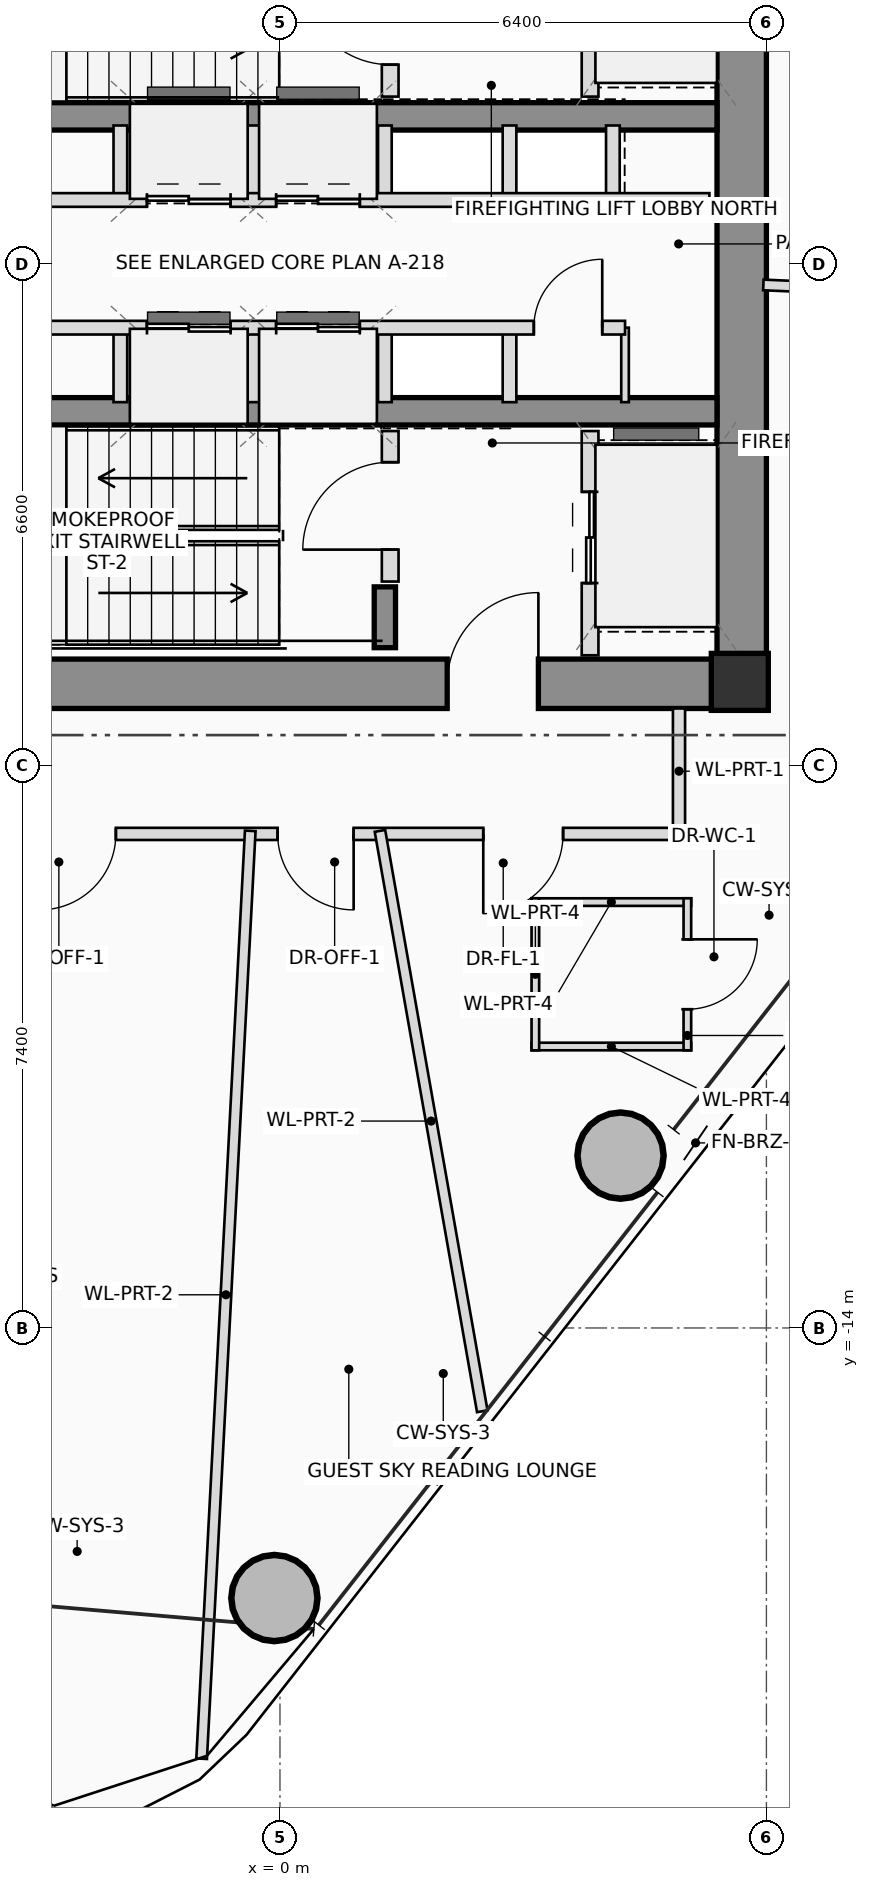
"""IFC4 building model, lengths in metres.
Left out: names, types, materials, properties, quantities, classifications, styles, units other than length and angle.
Written with IfcOpenShell. Run it as: python <this file> out.ifc"""

import sys

from ifc_helpers import new_model, si_unit, direction, frame, frame_2d, origin, origin_2d, place, context, subcontext, project, spatial, rectangle, hollow_circle, extrude, source, transform, mapped, element, fill, save


model = new_model("IFC4")
c1 = context("Model", 3, precision=1e-05, world=origin(), true_north=direction((0.0, 1.0)))
c2 = subcontext(c1, "Body", "Model", "MODEL_VIEW")
j1 = project(units=[si_unit("LENGTHUNIT", "METRE"), si_unit("PLANEANGLEUNIT", "RADIAN")], contexts=[c1])
p1 = place(None, origin())
s1 = spatial("IfcSite", under=j1, at=p1, CompositionType="ELEMENT")
p2 = place(p1, origin())
s2 = spatial("IfcBuilding", under=s1, at=p2, CompositionType="ELEMENT")
p3 = place(p2, frame((0.0, 0.0, 191.45)))
s3 = spatial("IfcBuildingStorey", under=s2, at=p3, CompositionType="ELEMENT", Elevation=191.45)
m1 = source(origin(), c2, "Body", "SweptSolid", [
    extrude(rectangle(XDim=0.75, YDim=0.75, at=origin_2d()), origin(), (0.0, 0.0, 1.0), 3.45),
])
p4 = place(p3, frame((6.05, -5.5, 0.0), z_axis=(0.0, 0.0, 1.0), x_axis=(1.0, 0.0, 0.0)))
e1 = element("IfcColumn", 1, at=p4, inside=s3, PredefinedType="COLUMN", context=c2, shape_type="MappedRepresentation", body=[
    mapped(m1, transform((0.0, 0.0, 0.0), scale=1.0)),
])
p5 = place(p3, frame((-6.4, -5.525, 0.0), z_axis=(0.0, 0.0, 1.0), x_axis=(1.0, 0.0, 0.0)))
e2 = element("IfcWall", 2, at=p5, inside=s3, PredefinedType="SHEAR", context=c2, shape_type="SweptSolid", body=[
    extrude(rectangle(XDim=12.8, YDim=0.65, at=frame_2d((6.4, 0.0))), origin(), (0.0, 0.0, 1.0), 3.45),
])
p6 = place(p5, frame((8.6, 0.0, 0.0)))
e3 = element("IfcOpeningElement", 3, at=p6, cuts=e2, PredefinedType="OPENING", context=c2, shape_type="SweptSolid", body=[
    extrude(rectangle(XDim=1.2, YDim=2.2, at=frame_2d((0.6, 1.1))), frame((0.0, 0.335, 0.0), z_axis=(0.0, -1.0, 0.0), x_axis=(1.0, 0.0, 0.0)), (0.0, 0.0, 1.0), 0.67),
])
p7 = place(p3, frame((6.075, -5.2, 0.0), z_axis=(0.0, 0.0, 1.0), x_axis=(0.0, 1.0, 0.0)))
e4 = element("IfcWall", 4, at=p7, inside=s3, PredefinedType="SHEAR", context=c2, shape_type="SweptSolid", body=[
    extrude(rectangle(XDim=10.4, YDim=0.65, at=frame_2d((5.2, 0.0))), origin(), (0.0, 0.0, 1.0), 3.45),
])
for number, where, z_axis, x_axis in (
    (5, (-5.75, 1.94, 0.0), (0.0, 0.0, 1.0), (1.0, 0.0, 0.0)),
    (6, (-5.75, -1.94, 0.0), (0.0, 0.0, 1.0), (1.0, 0.0, 0.0)),
):
    element("IfcWall", number, at=place(p3, frame(where, z_axis=z_axis, x_axis=x_axis)), inside=s3, PredefinedType="SHEAR", context=c2, shape_type="SweptSolid", body=[
        extrude(rectangle(XDim=11.5, YDim=0.36, at=frame_2d((5.75, 0.0))), origin(), (0.0, 0.0, 1.0), 3.45),
    ])
p8 = place(p3, frame((1.38, -5.05, 0.0), z_axis=(0.0, 0.0, 1.0), x_axis=(0.0, 1.0, 0.0)))
e7 = element("IfcWall", 7, at=p8, inside=s3, PredefinedType="SHEAR", context=c2, shape_type="SweptSolid", body=[
    extrude(rectangle(XDim=0.8, YDim=0.28, at=frame_2d((0.4, 0.0))), origin(), (0.0, 0.0, 1.0), 3.45),
])
m2 = source(origin(), c2, "Body", "SweptSolid", [
    extrude(hollow_circle(Radius=0.575, WallThickness=0.042, at=origin_2d()), origin(), (0.0, 0.0, 1.0), 3.45),
])
for number, where, z_axis, x_axis in (
    (8, (-0.073, -17.553, 0.0), (0.0, 0.0, 1.0), (1.0, 0.0, 0.0)),
    (9, (4.481, -11.732, 0.0), (0.0, 0.0, 1.0), (1.0, 0.0, 0.0)),
):
    element("IfcColumn", number, at=place(p3, frame(where, z_axis=z_axis, x_axis=x_axis)), inside=s3, PredefinedType="COLUMN", context=c2, shape_type="MappedRepresentation", body=[
        mapped(m2, transform((0.0, 0.0, 0.0), scale=1.0)),
    ])
p9 = place(p3, frame((1.45, 2.2, 0.0), z_axis=(0.0, 0.0, 1.0), x_axis=(0.0, 1.0, 0.0)))
e10 = element("IfcWall", 10, at=p9, inside=s3, PredefinedType="PLUMBINGWALL", context=c2, shape_type="SweptSolid", body=[
    extrude(rectangle(XDim=1.98, YDim=0.22, at=frame_2d((0.99, 0.0))), origin(), (0.0, 0.0, 1.0), 3.25),
])
p10 = place(p9, frame((0.42, 0.0, 0.0)))
e11 = element("IfcOpeningElement", 11, at=p10, cuts=e10, PredefinedType="OPENING", context=c2, shape_type="SweptSolid", body=[
    extrude(rectangle(XDim=1.15, YDim=2.15, at=frame_2d((0.575, 1.075))), frame((0.0, 0.12, 0.0), z_axis=(0.0, -1.0, 0.0), x_axis=(1.0, 0.0, 0.0)), (0.0, 0.0, 1.0), 0.24),
])
p11 = place(p3, frame((4.08, 2.2, 0.0), z_axis=(0.0, 0.0, 1.0), x_axis=(0.0, 1.0, 0.0)))
e12 = element("IfcWall", 12, at=p11, inside=s3, PredefinedType="PLUMBINGWALL", context=c2, shape_type="SweptSolid", body=[
    extrude(rectangle(XDim=2.95, YDim=0.22, at=frame_2d((1.475, 0.0))), origin(), (0.0, 0.0, 1.0), 3.25),
])
p12 = place(p11, frame((0.75, 0.0, 0.0)))
e13 = element("IfcOpeningElement", 13, at=p12, cuts=e12, PredefinedType="OPENING", context=c2, shape_type="SweptSolid", body=[
    extrude(rectangle(XDim=1.2, YDim=2.25, at=frame_2d((0.6, 1.125))), frame((0.0, 0.12, 0.0), z_axis=(0.0, -1.0, 0.0), x_axis=(1.0, 0.0, 0.0)), (0.0, 0.0, 1.0), 0.24),
])
p13 = place(p3, frame((1.45, -4.18, 0.0), z_axis=(0.0, 0.0, 1.0), x_axis=(0.0, 1.0, 0.0)))
e14 = element("IfcWall", 14, at=p13, inside=s3, PredefinedType="PLUMBINGWALL", context=c2, shape_type="SweptSolid", body=[
    extrude(rectangle(XDim=1.98, YDim=0.22, at=frame_2d((0.99, 0.0))), origin(), (0.0, 0.0, 1.0), 3.25),
])
p14 = place(p13, frame((0.42, 0.0, 0.0)))
e15 = element("IfcOpeningElement", 15, at=p14, cuts=e14, PredefinedType="OPENING", context=c2, shape_type="SweptSolid", body=[
    extrude(rectangle(XDim=1.15, YDim=2.15, at=frame_2d((0.575, 1.075))), frame((0.0, 0.12, 0.0), z_axis=(0.0, -1.0, 0.0), x_axis=(1.0, 0.0, 0.0)), (0.0, 0.0, 1.0), 0.24),
])
p15 = place(p3, frame((4.08, -5.15, 0.0), z_axis=(0.0, 0.0, 1.0), x_axis=(0.0, 1.0, 0.0)))
e16 = element("IfcWall", 16, at=p15, inside=s3, PredefinedType="PLUMBINGWALL", context=c2, shape_type="SweptSolid", body=[
    extrude(rectangle(XDim=2.95, YDim=0.22, at=frame_2d((1.475, 0.0))), origin(), (0.0, 0.0, 1.0), 3.25),
])
p16 = place(p15, frame((0.95, 0.0, 0.0)))
e17 = element("IfcOpeningElement", 17, at=p16, cuts=e16, PredefinedType="OPENING", context=c2, shape_type="SweptSolid", body=[
    extrude(rectangle(XDim=1.2, YDim=2.25, at=frame_2d((0.6, 1.125))), frame((0.0, 0.12, 0.0), z_axis=(0.0, -1.0, 0.0), x_axis=(1.0, 0.0, 0.0)), (0.0, 0.0, 1.0), 0.24),
])
for number, where, z_axis, x_axis in (
    (18, (-2.1, 0.84, 0.0), (0.0, 0.0, 1.0), (0.0, 1.0, 0.0)),
    (19, (-2.1, -1.82, 0.0), (0.0, 0.0, 1.0), (0.0, 1.0, 0.0)),
    (20, (-0.35, 0.84, 0.0), (0.0, 0.0, 1.0), (0.0, 1.0, 0.0)),
    (21, (-0.35, -1.82, 0.0), (0.0, 0.0, 1.0), (0.0, 1.0, 0.0)),
    (22, (1.38, 0.84, 0.0), (0.0, 0.0, 1.0), (0.0, 1.0, 0.0)),
    (23, (1.38, -1.82, 0.0), (0.0, 0.0, 1.0), (0.0, 1.0, 0.0)),
    (24, (3.02, 0.84, 0.0), (0.0, 0.0, 1.0), (0.0, 1.0, 0.0)),
    (25, (4.38, 0.84, 0.0), (0.0, 0.0, 1.0), (0.0, 1.0, 0.0)),
    (26, (3.02, -1.82, 0.0), (0.0, 0.0, 1.0), (0.0, 1.0, 0.0)),
):
    element("IfcWall", number, at=place(p3, frame(where, z_axis=z_axis, x_axis=x_axis)), inside=s3, PredefinedType="PLUMBINGWALL", context=c2, shape_type="SweptSolid", body=[
        extrude(rectangle(XDim=0.98, YDim=0.18, at=frame_2d((0.49, 0.0))), origin(), (0.0, 0.0, 1.0), 3.25),
    ])
p17 = place(p3, frame((4.54, -1.82, 0.0), z_axis=(0.0, 0.0, 1.0), x_axis=(0.0, 1.0, 0.0)))
e27 = element("IfcWall", 27, at=p17, inside=s3, PredefinedType="PARTITIONING", context=c2, shape_type="SweptSolid", body=[
    extrude(rectangle(XDim=0.98, YDim=0.1, at=frame_2d((0.49, 0.0))), origin(), (0.0, 0.0, 1.0), 3.25),
])
p18 = place(p3, frame((-5.68, 0.84, 0.0), z_axis=(0.0, 0.0, 1.0), x_axis=(1.0, 0.0, 0.0)))
e28 = element("IfcWall", 28, at=p18, inside=s3, PredefinedType="PLUMBINGWALL", context=c2, shape_type="SweptSolid", body=[
    extrude(rectangle(XDim=11.33, YDim=0.18, at=frame_2d((5.665, 0.0))), origin(), (0.0, 0.0, 1.0), 3.25),
])
p19 = place(p18, frame((1.38, 0.0, 0.0)))
e29 = element("IfcOpeningElement", 29, at=p19, cuts=e28, PredefinedType="OPENING", context=c2, shape_type="SweptSolid", body=[
    extrude(rectangle(XDim=0.9, YDim=2.05, at=frame_2d((0.45, 1.025))), frame((0.0, 0.1, 0.0), z_axis=(0.0, -1.0, 0.0), x_axis=(1.0, 0.0, 0.0)), (0.0, 0.0, 1.0), 0.2),
])
p20 = place(p18, frame((3.93, 0.0, 0.0)))
e30 = element("IfcOpeningElement", 30, at=p20, cuts=e28, PredefinedType="OPENING", context=c2, shape_type="SweptSolid", body=[
    extrude(rectangle(XDim=1.1, YDim=2.2, at=frame_2d((0.55, 1.1))), frame((0.0, 0.1, 0.0), z_axis=(0.0, -1.0, 0.0), x_axis=(1.0, 0.0, 0.0)), (0.0, 0.0, 1.0), 0.2),
])
p21 = place(p18, frame((5.63, 0.0, 0.0)))
e31 = element("IfcOpeningElement", 31, at=p21, cuts=e28, PredefinedType="OPENING", context=c2, shape_type="SweptSolid", body=[
    extrude(rectangle(XDim=1.1, YDim=2.2, at=frame_2d((0.55, 1.1))), frame((0.0, 0.1, 0.0), z_axis=(0.0, -1.0, 0.0), x_axis=(1.0, 0.0, 0.0)), (0.0, 0.0, 1.0), 0.2),
])
p22 = place(p3, frame((-5.68, -0.84, 0.0), z_axis=(0.0, 0.0, 1.0), x_axis=(1.0, 0.0, 0.0)))
e32 = element("IfcWall", 32, at=p22, inside=s3, PredefinedType="PLUMBINGWALL", context=c2, shape_type="SweptSolid", body=[
    extrude(rectangle(XDim=10.22, YDim=0.18, at=frame_2d((5.11, 0.0))), origin(), (0.0, 0.0, 1.0), 3.25),
])
p23 = place(p22, frame((1.38, 0.0, 0.0)))
e33 = element("IfcOpeningElement", 33, at=p23, cuts=e32, PredefinedType="OPENING", context=c2, shape_type="SweptSolid", body=[
    extrude(rectangle(XDim=0.9, YDim=2.05, at=frame_2d((0.45, 1.025))), frame((0.0, 0.1, 0.0), z_axis=(0.0, -1.0, 0.0), x_axis=(1.0, 0.0, 0.0)), (0.0, 0.0, 1.0), 0.2),
])
p24 = place(p22, frame((3.93, 0.0, 0.0)))
e34 = element("IfcOpeningElement", 34, at=p24, cuts=e32, PredefinedType="OPENING", context=c2, shape_type="SweptSolid", body=[
    extrude(rectangle(XDim=1.1, YDim=2.2, at=frame_2d((0.55, 1.1))), frame((0.0, 0.1, 0.0), z_axis=(0.0, -1.0, 0.0), x_axis=(1.0, 0.0, 0.0)), (0.0, 0.0, 1.0), 0.2),
])
p25 = place(p22, frame((5.63, 0.0, 0.0)))
e35 = element("IfcOpeningElement", 35, at=p25, cuts=e32, PredefinedType="OPENING", context=c2, shape_type="SweptSolid", body=[
    extrude(rectangle(XDim=1.1, YDim=2.2, at=frame_2d((0.55, 1.1))), frame((0.0, 0.1, 0.0), z_axis=(0.0, -1.0, 0.0), x_axis=(1.0, 0.0, 0.0)), (0.0, 0.0, 1.0), 0.2),
])
p26 = place(p22, frame((9.02, 0.0, 0.0)))
e36 = element("IfcOpeningElement", 36, at=p26, cuts=e32, PredefinedType="OPENING", context=c2, shape_type="SweptSolid", body=[
    extrude(rectangle(XDim=0.9, YDim=2.05, at=frame_2d((0.45, 1.025))), frame((0.0, 0.1, 0.0), z_axis=(0.0, -1.0, 0.0), x_axis=(1.0, 0.0, 0.0)), (0.0, 0.0, 1.0), 0.2),
])
for number, where, z_axis, x_axis in (
    (37, (3.31, -8.397, 0.0), (0.0, 0.0, 1.0), (1.0, 0.0, 0.0)),
    (38, (5.41, -10.297, 0.0), (0.0, 0.0, 1.0), (-1.0, 0.0, 0.0)),
):
    element("IfcWall", number, at=place(p3, frame(where, z_axis=z_axis, x_axis=x_axis)), inside=s3, PredefinedType="PARTITIONING", context=c2, shape_type="SweptSolid", body=[
        extrude(rectangle(XDim=2.1, YDim=0.1, at=frame_2d((1.05, 0.0))), origin(), (0.0, 0.0, 1.0), 2.605),
    ])
p27 = place(p3, frame((5.36, -8.347, 0.0), z_axis=(0.0, 0.0, 1.0), x_axis=(0.0, -1.0, 0.0)))
e39 = element("IfcWall", 39, at=p27, inside=s3, PredefinedType="PARTITIONING", context=c2, shape_type="SweptSolid", body=[
    extrude(rectangle(XDim=2.0, YDim=0.1, at=frame_2d((1.0, 0.0))), origin(), (0.0, 0.0, 1.0), 2.605),
])
p28 = place(p27, frame((0.54, 0.0, 0.0)))
e40 = element("IfcOpeningElement", 40, at=p28, cuts=e39, PredefinedType="OPENING", context=c2, shape_type="SweptSolid", body=[
    extrude(rectangle(XDim=0.92, YDim=2.1, at=frame_2d((0.46, 1.05))), frame((0.0, 0.06, 0.0), z_axis=(0.0, -1.0, 0.0), x_axis=(1.0, 0.0, 0.0)), (0.0, 0.0, 1.0), 0.12),
])
p29 = place(p3, frame((3.36, -10.347, 0.0), z_axis=(0.0, 0.0, 1.0), x_axis=(0.0, 1.0, 0.0)))
e41 = element("IfcWall", 41, at=p29, inside=s3, PredefinedType="PARTITIONING", context=c2, shape_type="SweptSolid", body=[
    extrude(rectangle(XDim=2.0, YDim=0.1, at=frame_2d((1.0, 0.0))), origin(), (0.0, 0.0, 1.0), 2.805),
])
p30 = place(p3, frame((5.25, -5.85, 0.0), z_axis=(0.0, 0.0, 1.0), x_axis=(0.0, -1.0, 0.0)))
e42 = element("IfcWall", 42, at=p30, inside=s3, PredefinedType="PARTITIONING", context=c2, shape_type="SweptSolid", body=[
    extrude(rectangle(XDim=1.65, YDim=0.16, at=frame_2d((0.825, 0.0))), origin(), (0.0, 0.0, 1.0), 3.25),
])
p31 = place(p3, frame((5.25, -7.5, 0.0), z_axis=(0.0, 0.0, 1.0), x_axis=(-1.0, 0.0, 0.0)))
e43 = element("IfcWall", 43, at=p31, inside=s3, PredefinedType="PARTITIONING", context=c2, shape_type="SweptSolid", body=[
    extrude(rectangle(XDim=11.61, YDim=0.16, at=frame_2d((5.805, 0.0))), origin(), (0.0, 0.0, 1.0), 2.605),
])
p32 = place(p31, frame((1.525, 0.0, 0.0)))
e44 = element("IfcOpeningElement", 44, at=p32, cuts=e43, PredefinedType="OPENING", context=c2, shape_type="SweptSolid", body=[
    extrude(rectangle(XDim=1.05, YDim=2.2, at=frame_2d((0.525, 1.1))), frame((0.0, 0.09, 0.0), z_axis=(0.0, -1.0, 0.0), x_axis=(1.0, 0.0, 0.0)), (0.0, 0.0, 1.0), 0.18),
])
p33 = place(p31, frame((4.281, 0.0, 0.0)))
e45 = element("IfcOpeningElement", 45, at=p33, cuts=e43, PredefinedType="OPENING", context=c2, shape_type="SweptSolid", body=[
    extrude(rectangle(XDim=1.0, YDim=2.25, at=frame_2d((0.5, 1.125))), frame((0.0, 0.09, 0.0), z_axis=(0.0, -1.0, 0.0), x_axis=(1.0, 0.0, 0.0)), (0.0, 0.0, 1.0), 0.18),
])
p34 = place(p31, frame((7.409, 0.0, 0.0)))
e46 = element("IfcOpeningElement", 46, at=p34, cuts=e43, PredefinedType="OPENING", context=c2, shape_type="SweptSolid", body=[
    extrude(rectangle(XDim=1.0, YDim=2.25, at=frame_2d((0.5, 1.125))), frame((0.0, 0.09, 0.0), z_axis=(0.0, -1.0, 0.0), x_axis=(1.0, 0.0, 0.0)), (0.0, 0.0, 1.0), 0.18),
])
p35 = place(p3, frame((6.36, -0.278, 0.0), z_axis=(0.0, 0.0, 1.0), x_axis=(0.999047276506, -0.04364102778, 0.0)))
e47 = element("IfcWall", 47, at=p35, inside=s3, PredefinedType="PARTITIONING", context=c2, shape_type="SweptSolid", body=[
    extrude(rectangle(XDim=7.642, YDim=0.14, at=frame_2d((3.821, 0.0))), origin(), (0.0, 0.0, 1.0), 2.605),
])
p36 = place(p3, frame((-0.391, -7.46, 0.0), z_axis=(0.0, 0.0, 1.0), x_axis=(-0.052329252614, -0.998629886054, 0.0)))
e48 = element("IfcWall", 48, at=p36, inside=s3, PredefinedType="PARTITIONING", context=c2, shape_type="SweptSolid", body=[
    extrude(rectangle(XDim=12.224, YDim=0.14, at=frame_2d((6.112, 0.0))), origin(), (0.0, 0.0, 1.0), 2.605),
])
p37 = place(p3, frame((1.315, -7.46, 0.0), z_axis=(0.0, 0.0, 1.0), x_axis=(0.173654204409, -0.984806690316, 0.0)))
e49 = element("IfcWall", 49, at=p37, inside=s3, PredefinedType="PARTITIONING", context=c2, shape_type="SweptSolid", body=[
    extrude(rectangle(XDim=7.754, YDim=0.14, at=frame_2d((3.877, 0.0))), origin(), (0.0, 0.0, 1.0), 2.765),
])
p38 = place(p6, origin())
e50 = element("IfcDoor", 50, at=p38, inside=s3, OperationType="SINGLE_SWING_RIGHT", PredefinedType="DOOR", context=c2, shape_type="SweptSolid", body=[
    extrude(rectangle(XDim=1.2, YDim=2.2, at=frame_2d((0.6, 1.1))), frame((0.0, 0.025, 0.0), z_axis=(0.0, -1.0, 0.0), x_axis=(1.0, 0.0, 0.0)), (0.0, 0.0, 1.0), 0.05),
])
fill(e3, e50)
p39 = place(p10, origin())
e51 = element("IfcDoor", 51, at=p39, inside=s3, OperationType="SINGLE_SWING_RIGHT", PredefinedType="DOOR", context=c2, shape_type="SweptSolid", body=[
    extrude(rectangle(XDim=1.15, YDim=2.15, at=frame_2d((0.575, 1.075))), frame((0.0, 0.025, 0.0), z_axis=(0.0, -1.0, 0.0), x_axis=(1.0, 0.0, 0.0)), (0.0, 0.0, 1.0), 0.05),
])
fill(e11, e51)
p40 = place(p14, origin())
e52 = element("IfcDoor", 52, at=p40, inside=s3, OperationType="SINGLE_SWING_LEFT", PredefinedType="DOOR", context=c2, shape_type="SweptSolid", body=[
    extrude(rectangle(XDim=1.15, YDim=2.15, at=frame_2d((0.575, 1.075))), frame((0.0, 0.025, 0.0), z_axis=(0.0, -1.0, 0.0), x_axis=(1.0, 0.0, 0.0)), (0.0, 0.0, 1.0), 0.05),
])
fill(e15, e52)
p41 = place(p16, origin())
e53 = element("IfcDoor", 53, at=p41, inside=s3, OperationType="DOUBLE_DOOR_SLIDING", PredefinedType="DOOR", context=c2, shape_type="SweptSolid", body=[
    extrude(rectangle(XDim=1.2, YDim=2.25, at=frame_2d((0.6, 1.125))), frame((0.0, 0.025, 0.0), z_axis=(0.0, -1.0, 0.0), x_axis=(1.0, 0.0, 0.0)), (0.0, 0.0, 1.0), 0.05),
])
fill(e17, e53)
p42 = place(p20, origin())
e54 = element("IfcDoor", 54, at=p42, inside=s3, OperationType="DOUBLE_DOOR_SLIDING", PredefinedType="DOOR", context=c2, shape_type="SweptSolid", body=[
    extrude(rectangle(XDim=1.1, YDim=2.2, at=frame_2d((0.55, 1.1))), frame((0.0, 0.025, 0.0), z_axis=(0.0, -1.0, 0.0), x_axis=(1.0, 0.0, 0.0)), (0.0, 0.0, 1.0), 0.05),
])
fill(e30, e54)
p43 = place(p21, origin())
e55 = element("IfcDoor", 55, at=p43, inside=s3, OperationType="DOUBLE_DOOR_SLIDING", PredefinedType="DOOR", context=c2, shape_type="SweptSolid", body=[
    extrude(rectangle(XDim=1.1, YDim=2.2, at=frame_2d((0.55, 1.1))), frame((0.0, 0.025, 0.0), z_axis=(0.0, -1.0, 0.0), x_axis=(1.0, 0.0, 0.0)), (0.0, 0.0, 1.0), 0.05),
])
fill(e31, e55)
p44 = place(p24, origin())
e56 = element("IfcDoor", 56, at=p44, inside=s3, OperationType="DOUBLE_DOOR_SLIDING", PredefinedType="DOOR", context=c2, shape_type="SweptSolid", body=[
    extrude(rectangle(XDim=1.1, YDim=2.2, at=frame_2d((0.55, 1.1))), frame((0.0, 0.025, 0.0), z_axis=(0.0, -1.0, 0.0), x_axis=(1.0, 0.0, 0.0)), (0.0, 0.0, 1.0), 0.05),
])
fill(e34, e56)
p45 = place(p25, origin())
e57 = element("IfcDoor", 57, at=p45, inside=s3, OperationType="DOUBLE_DOOR_SLIDING", PredefinedType="DOOR", context=c2, shape_type="SweptSolid", body=[
    extrude(rectangle(XDim=1.1, YDim=2.2, at=frame_2d((0.55, 1.1))), frame((0.0, 0.025, 0.0), z_axis=(0.0, -1.0, 0.0), x_axis=(1.0, 0.0, 0.0)), (0.0, 0.0, 1.0), 0.05),
])
fill(e35, e57)
p46 = place(p26, origin())
e58 = element("IfcDoor", 58, at=p46, inside=s3, OperationType="SINGLE_SWING_RIGHT", PredefinedType="DOOR", context=c2, shape_type="SweptSolid", body=[
    extrude(rectangle(XDim=0.9, YDim=2.05, at=frame_2d((0.45, 1.025))), frame((0.0, 0.025, 0.0), z_axis=(0.0, -1.0, 0.0), x_axis=(1.0, 0.0, 0.0)), (0.0, 0.0, 1.0), 0.05),
])
fill(e36, e58)
p47 = place(p28, origin())
e59 = element("IfcDoor", 59, at=p47, inside=s3, OperationType="SINGLE_SWING_LEFT", PredefinedType="DOOR", context=c2, shape_type="SweptSolid", body=[
    extrude(rectangle(XDim=0.92, YDim=2.1, at=frame_2d((0.46, 1.05))), frame((0.0, 0.025, 0.0), z_axis=(0.0, -1.0, 0.0), x_axis=(1.0, 0.0, 0.0)), (0.0, 0.0, 1.0), 0.05),
])
fill(e40, e59)
p48 = place(p32, origin())
e60 = element("IfcDoor", 60, at=p48, inside=s3, OperationType="SINGLE_SWING_RIGHT", PredefinedType="DOOR", context=c2, shape_type="SweptSolid", body=[
    extrude(rectangle(XDim=1.05, YDim=2.2, at=frame_2d((0.525, 1.1))), frame((0.0, 0.025, 0.0), z_axis=(0.0, -1.0, 0.0), x_axis=(1.0, 0.0, 0.0)), (0.0, 0.0, 1.0), 0.05),
])
fill(e44, e60)
p49 = place(p33, origin())
e61 = element("IfcDoor", 61, at=p49, inside=s3, OperationType="SINGLE_SWING_LEFT", PredefinedType="DOOR", context=c2, shape_type="SweptSolid", body=[
    extrude(rectangle(XDim=1.0, YDim=2.25, at=frame_2d((0.5, 1.125))), frame((0.0, 0.025, 0.0), z_axis=(0.0, -1.0, 0.0), x_axis=(1.0, 0.0, 0.0)), (0.0, 0.0, 1.0), 0.05),
])
fill(e45, e61)
p50 = place(p34, origin())
e62 = element("IfcDoor", 62, at=p50, inside=s3, OperationType="SINGLE_SWING_RIGHT", PredefinedType="DOOR", context=c2, shape_type="SweptSolid", body=[
    extrude(rectangle(XDim=1.0, YDim=2.25, at=frame_2d((0.5, 1.125))), frame((0.0, 0.025, 0.0), z_axis=(0.0, -1.0, 0.0), x_axis=(1.0, 0.0, 0.0)), (0.0, 0.0, 1.0), 0.05),
])
fill(e46, e62)
save(model, sys.argv[1])
